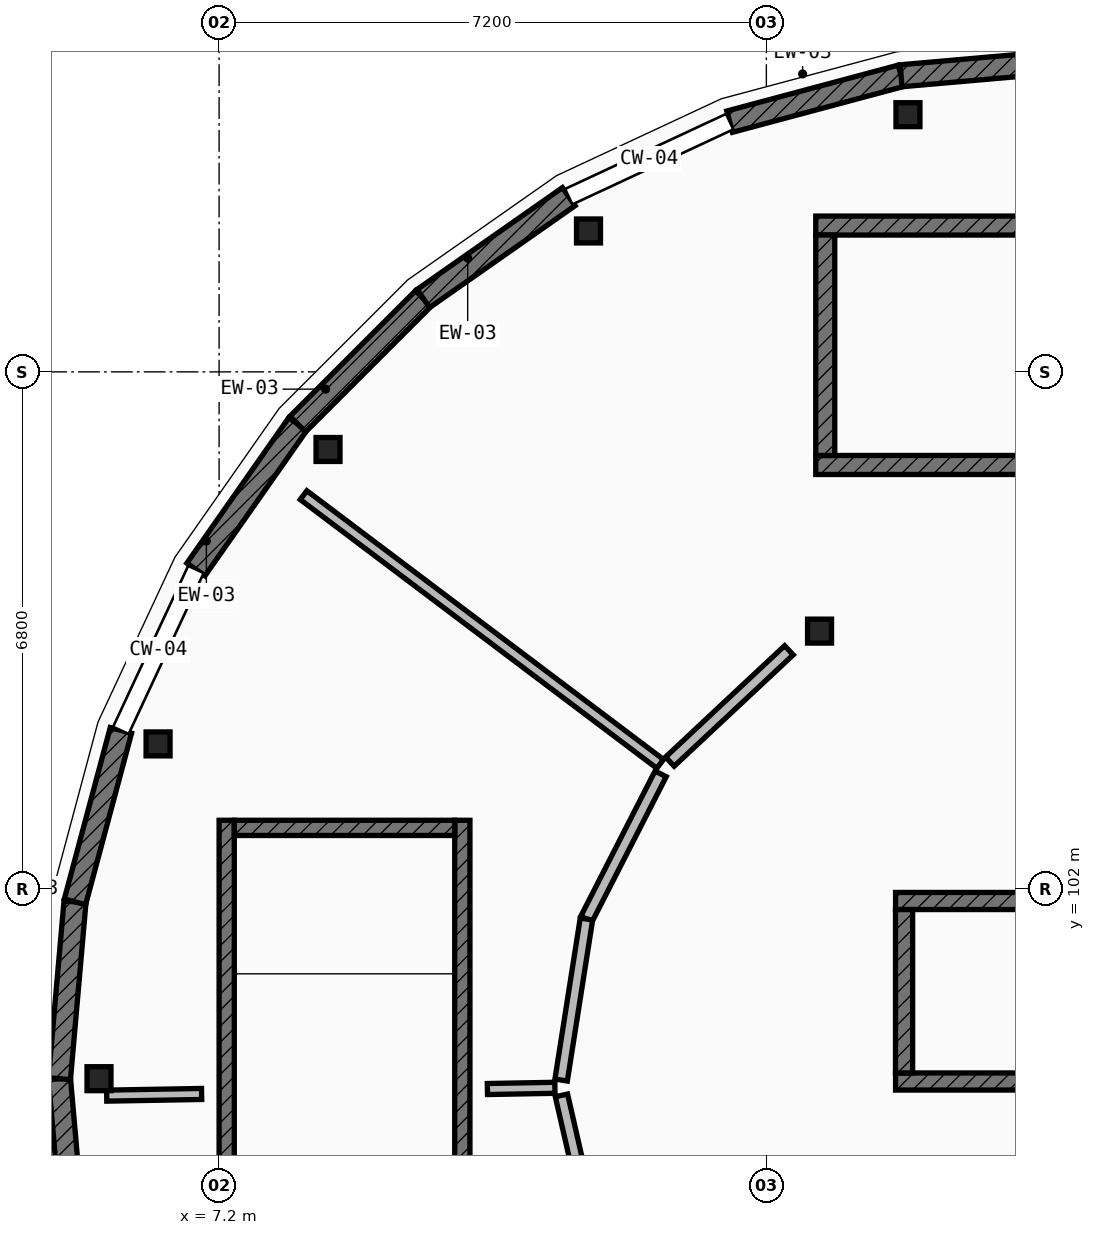
"""IFC4 building model, lengths in metres.
Left out: names, types, materials, properties, quantities, classifications, styles, units other than length and angle.
Written with IfcOpenShell. Run it as: python <this file> out.ifc"""

import sys

from ifc_helpers import new_model, si_unit, direction, frame, frame_2d, origin, origin_2d, place, context, subcontext, project, spatial, rectangle, extrude, element, fill, save


model = new_model("IFC4")
c1 = context("Model", 3, precision=1e-05, world=origin(), true_north=direction((0.0, 1.0)))
c2 = subcontext(c1, "Body", "Model", "MODEL_VIEW")
j1 = project(units=[si_unit("LENGTHUNIT", "METRE"), si_unit("PLANEANGLEUNIT", "RADIAN")], contexts=[c1])
p1 = place(None, origin())
s1 = spatial("IfcSite", under=j1, at=p1, CompositionType="ELEMENT")
p2 = place(p1, origin())
s2 = spatial("IfcBuilding", under=s1, at=p2, CompositionType="ELEMENT")
p3 = place(p2, frame((0.0, 0.0, 12.95)))
s3 = spatial("IfcBuildingStorey", under=s2, at=p3, CompositionType="ELEMENT", Elevation=12.95)
for number, where, z_axis, x_axis in (
    (1, (16.263, 112.184, 0.0), (0.0, 0.0, 1.0), (1.0, 0.0, 0.0)),
    (2, (12.06, 110.654, 0.0), (0.0, 0.0, 1.0), (1.0, 0.0, 0.0)),
    (3, (8.633, 107.779, 0.0), (0.0, 0.0, 1.0), (1.0, 0.0, 0.0)),
    (4, (6.397, 103.905, 0.0), (0.0, 0.0, 1.0), (1.0, 0.0, 0.0)),
    (5, (5.62, 99.5, 0.0), (0.0, 0.0, 1.0), (1.0, 0.0, 0.0)),
    (6, (15.1, 105.389, 0.0), (0.0, 0.0, 1.0), (1.0, 0.0, 0.0)),
):
    element("IfcColumn", number, at=place(p3, frame(where, z_axis=z_axis, x_axis=x_axis)), inside=s3, PredefinedType="COLUMN", context=c2, shape_type="SweptSolid", body=[
        extrude(rectangle(XDim=0.315, YDim=0.315, at=origin_2d()), origin(), (0.0, 0.0, 1.0), 4.2),
    ])
for number, where, z_axis, x_axis in (
    (7, (5.304, 97.173, 0.0), (0.0, 0.0, 1.0), (-0.087, 0.996, 0.0)),
    (8, (5.1, 99.5, 0.0), (0.0, 0.0, 1.0), (0.087, 0.996, 0.0)),
):
    element("IfcWall", number, at=place(p3, frame(where, z_axis=z_axis, x_axis=x_axis)), inside=s3, PredefinedType="ELEMENTEDWALL", context=c2, shape_type="SweptSolid", body=[
        extrude(rectangle(XDim=2.336, YDim=0.29, at=frame_2d((1.168, 0.0))), origin(), (0.0, 0.0, 1.0), 3.349),
    ])
p4 = place(p3, frame((5.304, 101.827, 0.0), z_axis=(0.0, 0.0, 1.0), x_axis=(0.258612423585, 0.965981166673, 0.0)))
e9 = element("IfcWall", 9, at=p4, inside=s3, PredefinedType="ELEMENTEDWALL", context=c2, shape_type="SweptSolid", body=[
    extrude(rectangle(XDim=2.335, YDim=0.29, at=frame_2d((1.168, 0.0))), origin(), (0.0, 0.0, 1.0), 3.349),
])
p5 = place(p4, frame((0.618, 0.0, 0.85)))
e10 = element("IfcOpeningElement", 10, at=p5, cuts=e9, PredefinedType="OPENING", context=c2, shape_type="SweptSolid", body=[
    extrude(rectangle(XDim=1.1, YDim=2.1, at=frame_2d((0.55, 1.05))), frame((0.0, 0.155, 0.0), z_axis=(0.0, -1.0, 0.0), x_axis=(1.0, 0.0, 0.0)), (0.0, 0.0, 1.0), 0.31),
])
p6 = place(p3, frame((6.895, 106.2, 0.0), z_axis=(0.0, 0.0, 1.0), x_axis=(0.573728883722, 0.819045278347, 0.0)))
e11 = element("IfcWall", 11, at=p6, inside=s3, PredefinedType="ELEMENTEDWALL", context=c2, shape_type="SweptSolid", body=[
    extrude(rectangle(XDim=2.336, YDim=0.29, at=frame_2d((1.168, 0.0))), origin(), (0.0, 0.0, 1.0), 3.349),
])
p7 = place(p6, frame((0.608, 0.0, 0.85)))
e12 = element("IfcOpeningElement", 12, at=p7, cuts=e11, PredefinedType="OPENING", context=c2, shape_type="SweptSolid", body=[
    extrude(rectangle(XDim=1.12, YDim=1.65, at=frame_2d((0.56, 0.825))), frame((0.0, 0.155, 0.0), z_axis=(0.0, -1.0, 0.0), x_axis=(1.0, 0.0, 0.0)), (0.0, 0.0, 1.0), 0.31),
])
p8 = place(p3, frame((8.235, 108.113, 0.0), z_axis=(0.0, 0.0, 1.0), x_axis=(0.707106781187, 0.707106781187, 0.0)))
e13 = element("IfcWall", 13, at=p8, inside=s3, PredefinedType="ELEMENTEDWALL", context=c2, shape_type="SweptSolid", body=[
    extrude(rectangle(XDim=2.336, YDim=0.29, at=frame_2d((1.168, 0.0))), origin(), (0.0, 0.0, 1.0), 3.349),
])
p9 = place(p8, frame((0.593, 0.0, 0.85)))
e14 = element("IfcOpeningElement", 14, at=p9, cuts=e13, PredefinedType="OPENING", context=c2, shape_type="SweptSolid", body=[
    extrude(rectangle(XDim=1.15, YDim=1.4, at=frame_2d((0.575, 0.7))), frame((0.0, 0.155, 0.0), z_axis=(0.0, -1.0, 0.0), x_axis=(1.0, 0.0, 0.0)), (0.0, 0.0, 1.0), 0.31),
])
p10 = place(p3, frame((9.887, 109.765, 0.0), z_axis=(0.0, 0.0, 1.0), x_axis=(0.819045278347, 0.573728883722, 0.0)))
e15 = element("IfcWall", 15, at=p10, inside=s3, PredefinedType="ELEMENTEDWALL", context=c2, shape_type="SweptSolid", body=[
    extrude(rectangle(XDim=2.336, YDim=0.29, at=frame_2d((1.168, 0.0))), origin(), (0.0, 0.0, 1.0), 3.349),
])
p11 = place(p10, frame((0.593, 0.0, 0.85)))
e16 = element("IfcOpeningElement", 16, at=p11, cuts=e15, PredefinedType="OPENING", context=c2, shape_type="SweptSolid", body=[
    extrude(rectangle(XDim=1.15, YDim=1.7, at=frame_2d((0.575, 0.85))), frame((0.0, 0.155, 0.0), z_axis=(0.0, -1.0, 0.0), x_axis=(1.0, 0.0, 0.0)), (0.0, 0.0, 1.0), 0.31),
])
p12 = place(p3, frame((13.917, 112.092, 0.0), z_axis=(0.0, 0.0, 1.0), x_axis=(0.965981166673, 0.258612423585, 0.0)))
e17 = element("IfcWall", 17, at=p12, inside=s3, PredefinedType="ELEMENTEDWALL", context=c2, shape_type="SweptSolid", body=[
    extrude(rectangle(XDim=2.335, YDim=0.29, at=frame_2d((1.168, 0.0))), origin(), (0.0, 0.0, 1.0), 3.349),
])
p13 = place(p12, frame((0.593, 0.0, 0.85)))
e18 = element("IfcOpeningElement", 18, at=p13, cuts=e17, PredefinedType="OPENING", context=c2, shape_type="SweptSolid", body=[
    extrude(rectangle(XDim=1.15, YDim=2.0, at=frame_2d((0.575, 1.0))), frame((0.0, 0.155, 0.0), z_axis=(0.0, -1.0, 0.0), x_axis=(1.0, 0.0, 0.0)), (0.0, 0.0, 1.0), 0.31),
])
p14 = place(p3, frame((16.173, 112.696, 0.0), z_axis=(0.0, 0.0, 1.0), x_axis=(0.996184295282, 0.087274565792, 0.0)))
e19 = element("IfcWall", 19, at=p14, inside=s3, PredefinedType="ELEMENTEDWALL", context=c2, shape_type="SweptSolid", body=[
    extrude(rectangle(XDim=2.336, YDim=0.29, at=frame_2d((1.168, 0.0))), origin(), (0.0, 0.0, 1.0), 3.349),
])
p15 = place(p3, frame((15.05, 107.575, 0.0), z_axis=(0.0, 0.0, 1.0), x_axis=(1.0, 0.0, 0.0)))
e20 = element("IfcWall", 20, at=p15, inside=s3, PredefinedType="SHEAR", context=c2, shape_type="SweptSolid", body=[
    extrude(rectangle(XDim=6.9, YDim=0.25, at=frame_2d((3.45, 0.0))), origin(), (0.0, 0.0, 1.0), 3.995),
])
p16 = place(p15, frame((0.43, 0.0, 0.0)))
e21 = element("IfcOpeningElement", 21, at=p16, cuts=e20, PredefinedType="OPENING", context=c2, shape_type="SweptSolid", body=[
    extrude(rectangle(XDim=1.1, YDim=2.15, at=frame_2d((0.55, 1.075))), frame((0.0, 0.135, 0.0), z_axis=(0.0, -1.0, 0.0), x_axis=(1.0, 0.0, 0.0)), (0.0, 0.0, 1.0), 0.27),
])
p17 = place(p3, frame((15.05, 110.725, 0.0), z_axis=(0.0, 0.0, 1.0), x_axis=(1.0, 0.0, 0.0)))
e22 = element("IfcWall", 22, at=p17, inside=s3, PredefinedType="SHEAR", context=c2, shape_type="SweptSolid", body=[
    extrude(rectangle(XDim=6.9, YDim=0.25, at=frame_2d((3.45, 0.0))), origin(), (0.0, 0.0, 1.0), 3.995),
])
p18 = place(p3, frame((15.175, 107.7, 0.0), z_axis=(0.0, 0.0, 1.0), x_axis=(0.0, 1.0, 0.0)))
e23 = element("IfcWall", 23, at=p18, inside=s3, PredefinedType="SHEAR", context=c2, shape_type="SweptSolid", body=[
    extrude(rectangle(XDim=2.9, YDim=0.25, at=frame_2d((1.45, 0.0))), origin(), (0.0, 0.0, 1.0), 3.995),
])
p19 = place(p3, frame((10.4, 96.1, 0.0), z_axis=(0.0, 0.0, 1.0), x_axis=(0.0, 1.0, 0.0)))
e24 = element("IfcWall", 24, at=p19, inside=s3, PredefinedType="SHEAR", context=c2, shape_type="SweptSolid", body=[
    extrude(rectangle(XDim=6.8, YDim=0.2, at=frame_2d((3.4, 0.0))), origin(), (0.0, 0.0, 1.0), 3.995),
])
p20 = place(p19, frame((0.38, 0.0, 0.0)))
e25 = element("IfcOpeningElement", 25, at=p20, cuts=e24, PredefinedType="OPENING", context=c2, shape_type="SweptSolid", body=[
    extrude(rectangle(XDim=1.05, YDim=2.15, at=frame_2d((0.525, 1.075))), frame((0.0, 0.11, 0.0), z_axis=(0.0, -1.0, 0.0), x_axis=(1.0, 0.0, 0.0)), (0.0, 0.0, 1.0), 0.22),
])
p21 = place(p3, frame((7.3, 96.1, 0.0), z_axis=(0.0, 0.0, 1.0), x_axis=(0.0, 1.0, 0.0)))
e26 = element("IfcWall", 26, at=p21, inside=s3, PredefinedType="SHEAR", context=c2, shape_type="SweptSolid", body=[
    extrude(rectangle(XDim=6.8, YDim=0.2, at=frame_2d((3.4, 0.0))), origin(), (0.0, 0.0, 1.0), 3.995),
])
p22 = place(p3, frame((10.3, 102.8, 0.0), z_axis=(0.0, 0.0, 1.0), x_axis=(-1.0, 0.0, 0.0)))
e27 = element("IfcWall", 27, at=p22, inside=s3, PredefinedType="SHEAR", context=c2, shape_type="SweptSolid", body=[
    extrude(rectangle(XDim=2.9, YDim=0.2, at=frame_2d((1.45, 0.0))), origin(), (0.0, 0.0, 1.0), 3.995),
])
p23 = place(p3, frame((16.1, 99.463, 0.0), z_axis=(0.0, 0.0, 1.0), x_axis=(1.0, 0.0, 0.0)))
e28 = element("IfcWall", 28, at=p23, inside=s3, PredefinedType="SHEAR", context=c2, shape_type="SweptSolid", body=[
    extrude(rectangle(XDim=3.1, YDim=0.225, at=frame_2d((1.55, 0.0))), origin(), (0.0, 0.0, 1.0), 3.995),
])
p24 = place(p23, frame((0.95, 0.0, 0.0)))
e29 = element("IfcOpeningElement", 29, at=p24, cuts=e28, PredefinedType="OPENING", context=c2, shape_type="SweptSolid", body=[
    extrude(rectangle(XDim=1.2, YDim=2.2, at=frame_2d((0.6, 1.1))), frame((0.0, 0.123, 0.0), z_axis=(0.0, -1.0, 0.0), x_axis=(1.0, 0.0, 0.0)), (0.0, 0.0, 1.0), 0.245),
])
p25 = place(p3, frame((16.1, 101.838, 0.0), z_axis=(0.0, 0.0, 1.0), x_axis=(1.0, 0.0, 0.0)))
e30 = element("IfcWall", 30, at=p25, inside=s3, PredefinedType="SHEAR", context=c2, shape_type="SweptSolid", body=[
    extrude(rectangle(XDim=3.1, YDim=0.225, at=frame_2d((1.55, 0.0))), origin(), (0.0, 0.0, 1.0), 3.995),
])
p26 = place(p3, frame((16.212, 99.575, 0.0), z_axis=(0.0, 0.0, 1.0), x_axis=(0.0, 1.0, 0.0)))
e31 = element("IfcWall", 31, at=p26, inside=s3, PredefinedType="SHEAR", context=c2, shape_type="SweptSolid", body=[
    extrude(rectangle(XDim=2.15, YDim=0.225, at=frame_2d((1.075, 0.0))), origin(), (0.0, 0.0, 1.0), 3.995),
])
p27 = place(p3, frame((13.003, 103.642, 0.0), z_axis=(0.0, 0.0, 1.0), x_axis=(-0.798611576701, 0.601846782462, 0.0)))
e32 = element("IfcWall", 32, at=p27, inside=s3, PredefinedType="PARTITIONING", context=c2, shape_type="SweptSolid", body=[
    extrude(rectangle(XDim=5.875, YDim=0.145, at=frame_2d((2.938, 0.0))), origin(), (0.0, 0.0, 1.0), 3.324),
])
p28 = place(p3, frame((11.618, 99.38, 0.0), z_axis=(0.0, 0.0, 1.0), x_axis=(-0.999840336335, -0.017869018934, 0.0)))
e33 = element("IfcWall", 33, at=p28, inside=s3, PredefinedType="PARTITIONING", context=c2, shape_type="SweptSolid", body=[
    extrude(rectangle(XDim=0.888, YDim=0.145, at=frame_2d((0.444, 0.0))), origin(), (0.0, 0.0, 1.0), 3.324),
])
p29 = place(p3, frame((6.97, 99.299, 0.0), z_axis=(0.0, 0.0, 1.0), x_axis=(-0.999845298985, -0.017589147167, 0.0)))
e34 = element("IfcWall", 34, at=p29, inside=s3, PredefinedType="PARTITIONING", context=c2, shape_type="SweptSolid", body=[
    extrude(rectangle(XDim=1.249, YDim=0.145, at=frame_2d((0.625, 0.0))), origin(), (0.0, 0.0, 1.0), 3.324),
])
p30 = place(p3, frame((14.697, 105.137, 0.0), z_axis=(0.0, 0.0, 1.0), x_axis=(-0.73028240744, -0.683145376464, 0.0)))
e35 = element("IfcWall", 35, at=p30, inside=s3, PredefinedType="PARTITIONING", context=c2, shape_type="SweptSolid", body=[
    extrude(rectangle(XDim=2.144, YDim=0.165, at=frame_2d((1.072, 0.0))), origin(), (0.0, 0.0, 1.0), 3.324),
])
p31 = place(p30, frame((0.453, 0.0, 0.0)))
e36 = element("IfcOpeningElement", 36, at=p31, cuts=e35, PredefinedType="OPENING", context=c2, shape_type="SweptSolid", body=[
    extrude(rectangle(XDim=1.24, YDim=2.22, at=frame_2d((0.62, 1.11))), frame((0.0, 0.093, 0.0), z_axis=(0.0, -1.0, 0.0), x_axis=(1.0, 0.0, 0.0)), (0.0, 0.0, 1.0), 0.185),
])
p32 = place(p3, frame((13.009, 103.511, 0.0), z_axis=(0.0, 0.0, 1.0), x_axis=(-0.455072954242, -0.890454157337, 0.0)))
e37 = element("IfcWall", 37, at=p32, inside=s3, PredefinedType="PARTITIONING", context=c2, shape_type="SweptSolid", body=[
    extrude(rectangle(XDim=2.145, YDim=0.165, at=frame_2d((1.072, 0.0))), origin(), (0.0, 0.0, 1.0), 3.324),
])
p33 = place(p32, frame((0.433, 0.0, 0.0)))
e38 = element("IfcOpeningElement", 38, at=p33, cuts=e37, PredefinedType="OPENING", context=c2, shape_type="SweptSolid", body=[
    extrude(rectangle(XDim=1.28, YDim=2.3, at=frame_2d((0.64, 1.15))), frame((0.0, 0.093, 0.0), z_axis=(0.0, -1.0, 0.0), x_axis=(1.0, 0.0, 0.0)), (0.0, 0.0, 1.0), 0.185),
])
p34 = place(p3, frame((12.033, 101.601, 0.0), z_axis=(0.0, 0.0, 1.0), x_axis=(-0.155237833992, -0.987877125404, 0.0)))
e39 = element("IfcWall", 39, at=p34, inside=s3, PredefinedType="PARTITIONING", context=c2, shape_type="SweptSolid", body=[
    extrude(rectangle(XDim=2.145, YDim=0.165, at=frame_2d((1.073, 0.0))), origin(), (0.0, 0.0, 1.0), 3.324),
])
p35 = place(p3, frame((11.704, 99.28, 0.0), z_axis=(0.0, 0.0, 1.0), x_axis=(0.223158332348, -0.974782210909, 0.0)))
e40 = element("IfcWall", 40, at=p35, inside=s3, PredefinedType="PARTITIONING", context=c2, shape_type="SweptSolid", body=[
    extrude(rectangle(XDim=0.954, YDim=0.165, at=frame_2d((0.477, 0.0))), origin(), (0.0, 0.0, 1.0), 3.324),
])
p36 = place(p5, origin())
e41 = element("IfcWindow", 41, at=p36, inside=s3, PartitioningType="SINGLE_PANEL", PredefinedType="WINDOW", context=c2, shape_type="SweptSolid", body=[
    extrude(rectangle(XDim=1.1, YDim=2.1, at=frame_2d((0.55, 1.05))), frame((0.0, 0.03, 0.0), z_axis=(0.0, -1.0, 0.0), x_axis=(1.0, 0.0, 0.0)), (0.0, 0.0, 1.0), 0.06),
])
fill(e10, e41)
p37 = place(p7, origin())
e42 = element("IfcWindow", 42, at=p37, inside=s3, PartitioningType="SINGLE_PANEL", PredefinedType="WINDOW", context=c2, shape_type="SweptSolid", body=[
    extrude(rectangle(XDim=1.12, YDim=1.65, at=frame_2d((0.56, 0.825))), frame((0.0, 0.03, 0.0), z_axis=(0.0, -1.0, 0.0), x_axis=(1.0, 0.0, 0.0)), (0.0, 0.0, 1.0), 0.06),
])
fill(e12, e42)
p38 = place(p9, origin())
e43 = element("IfcWindow", 43, at=p38, inside=s3, PartitioningType="SINGLE_PANEL", PredefinedType="WINDOW", context=c2, shape_type="SweptSolid", body=[
    extrude(rectangle(XDim=1.15, YDim=1.4, at=frame_2d((0.575, 0.7))), frame((0.0, 0.03, 0.0), z_axis=(0.0, -1.0, 0.0), x_axis=(1.0, 0.0, 0.0)), (0.0, 0.0, 1.0), 0.06),
])
fill(e14, e43)
p39 = place(p11, origin())
e44 = element("IfcWindow", 44, at=p39, inside=s3, PartitioningType="SINGLE_PANEL", PredefinedType="WINDOW", context=c2, shape_type="SweptSolid", body=[
    extrude(rectangle(XDim=1.15, YDim=1.7, at=frame_2d((0.575, 0.85))), frame((0.0, 0.03, 0.0), z_axis=(0.0, -1.0, 0.0), x_axis=(1.0, 0.0, 0.0)), (0.0, 0.0, 1.0), 0.06),
])
fill(e16, e44)
p40 = place(p13, origin())
e45 = element("IfcWindow", 45, at=p40, inside=s3, PartitioningType="SINGLE_PANEL", PredefinedType="WINDOW", context=c2, shape_type="SweptSolid", body=[
    extrude(rectangle(XDim=1.15, YDim=2.0, at=frame_2d((0.575, 1.0))), frame((0.0, 0.03, 0.0), z_axis=(0.0, -1.0, 0.0), x_axis=(1.0, 0.0, 0.0)), (0.0, 0.0, 1.0), 0.06),
])
fill(e18, e45)
p41 = place(p16, origin())
e46 = element("IfcDoor", 46, at=p41, inside=s3, OperationType="SINGLE_SWING_LEFT", PredefinedType="DOOR", context=c2, shape_type="SweptSolid", body=[
    extrude(rectangle(XDim=1.1, YDim=2.15, at=frame_2d((0.55, 1.075))), frame((0.0, 0.025, 0.0), z_axis=(0.0, -1.0, 0.0), x_axis=(1.0, 0.0, 0.0)), (0.0, 0.0, 1.0), 0.05),
])
fill(e21, e46)
p42 = place(p24, origin())
e47 = element("IfcDoor", 47, at=p42, inside=s3, OperationType="DOUBLE_DOOR_SLIDING", PredefinedType="DOOR", context=c2, shape_type="SweptSolid", body=[
    extrude(rectangle(XDim=1.2, YDim=2.2, at=frame_2d((0.6, 1.1))), frame((0.0, 0.025, 0.0), z_axis=(0.0, -1.0, 0.0), x_axis=(1.0, 0.0, 0.0)), (0.0, 0.0, 1.0), 0.05),
])
fill(e29, e47)
p43 = place(p31, origin())
e48 = element("IfcDoor", 48, at=p43, inside=s3, OperationType="SINGLE_SWING_LEFT", PredefinedType="DOOR", context=c2, shape_type="SweptSolid", body=[
    extrude(rectangle(XDim=1.24, YDim=2.22, at=frame_2d((0.62, 1.11))), frame((0.0, 0.025, 0.0), z_axis=(0.0, -1.0, 0.0), x_axis=(1.0, 0.0, 0.0)), (0.0, 0.0, 1.0), 0.05),
])
fill(e36, e48)
p44 = place(p33, origin())
e49 = element("IfcDoor", 49, at=p44, inside=s3, OperationType="SINGLE_SWING_RIGHT", PredefinedType="DOOR", context=c2, shape_type="SweptSolid", body=[
    extrude(rectangle(XDim=1.28, YDim=2.3, at=frame_2d((0.64, 1.15))), frame((0.0, 0.025, 0.0), z_axis=(0.0, -1.0, 0.0), x_axis=(1.0, 0.0, 0.0)), (0.0, 0.0, 1.0), 0.05),
])
fill(e38, e49)
save(model, sys.argv[1])
